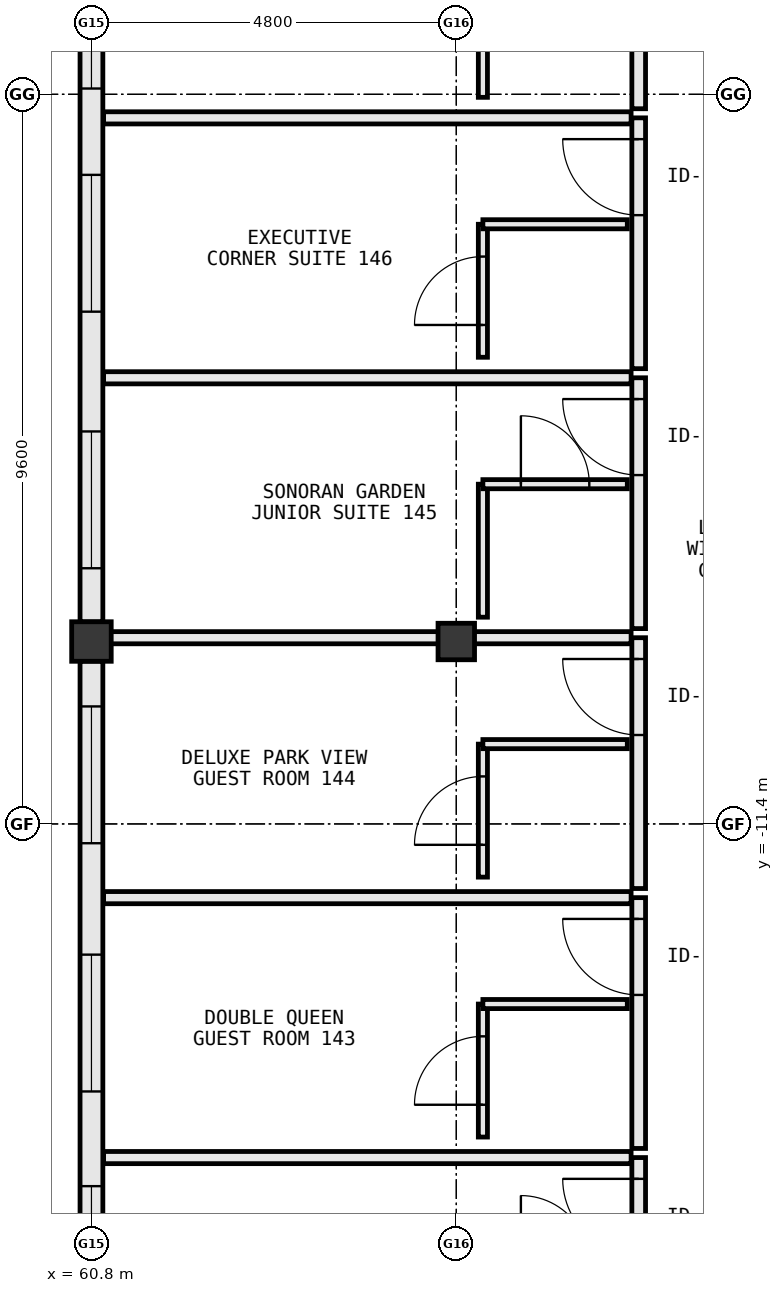
"""IFC4 building model, lengths in metres.
Left out: names, types, materials, properties, quantities, classifications, styles, units other than length and angle.
Written with IfcOpenShell. Run it as: python <this file> out.ifc"""

import sys

from ifc_helpers import new_model, si_unit, direction, frame, frame_2d, origin, origin_2d, place, context, subcontext, project, spatial, rectangle, extrude, element, fill, save


model = new_model("IFC4")
c1 = context("Model", 3, precision=1e-05, world=origin(), true_north=direction((0.0, 1.0)))
c2 = subcontext(c1, "Body", "Model", "MODEL_VIEW")
j1 = project(units=[si_unit("LENGTHUNIT", "METRE"), si_unit("PLANEANGLEUNIT", "RADIAN")], contexts=[c1])
p1 = place(None, origin())
s1 = spatial("IfcSite", under=j1, at=p1, CompositionType="ELEMENT")
p2 = place(p1, origin())
s2 = spatial("IfcBuilding", under=s1, at=p2, CompositionType="ELEMENT")
p3 = place(p2, frame((0.0, 0.0, 23.8)))
s3 = spatial("IfcBuildingStorey", under=s2, at=p3, CompositionType="ELEMENT", Elevation=23.8)
p4 = place(p3, frame((60.8, -9.0, 0.0), z_axis=(0.0, 0.0, 1.0), x_axis=(1.0, 0.0, 0.0)))
e1 = element("IfcColumn", 1, at=p4, inside=s3, PredefinedType="COLUMN", context=c2, shape_type="SweptSolid", body=[
    extrude(rectangle(XDim=0.52, YDim=0.52, at=origin_2d()), origin(), (0.0, 0.0, 1.0), 3.8),
])
p5 = place(p3, frame((65.6, -9.0, 0.0), z_axis=(0.0, 0.0, 1.0), x_axis=(1.0, 0.0, 0.0)))
e2 = element("IfcColumn", 2, at=p5, inside=s3, PredefinedType="COLUMN", context=c2, shape_type="SweptSolid", body=[
    extrude(rectangle(XDim=0.48, YDim=0.48, at=origin_2d()), origin(), (0.0, 0.0, 1.0), 3.8),
])
p6 = place(p3, frame((60.8, 0.342, 0.0), z_axis=(0.0, 0.0, 1.0), x_axis=(0.0, -1.0, 0.0)))
e3 = element("IfcWall", 3, at=p6, inside=s3, PredefinedType="STANDARD", context=c2, shape_type="SweptSolid", body=[
    extrude(rectangle(XDim=9.084, YDim=0.3, at=frame_2d((4.542, 0.0))), origin(), (0.0, 0.0, 1.0), 2.905),
])
p7 = place(p6, frame((6.578, 0.0, 0.85)))
e4 = element("IfcOpeningElement", 4, at=p7, cuts=e3, PredefinedType="OPENING", context=c2, shape_type="SweptSolid", body=[
    extrude(rectangle(XDim=1.8, YDim=1.85, at=frame_2d((0.9, 0.925))), frame((0.0, 0.162, 0.0), z_axis=(0.0, -1.0, 0.0), x_axis=(1.0, 0.0, 0.0)), (0.0, 0.0, 1.0), 0.324),
])
p8 = place(p6, frame((3.202, 0.0, 0.85)))
e5 = element("IfcOpeningElement", 5, at=p8, cuts=e3, PredefinedType="OPENING", context=c2, shape_type="SweptSolid", body=[
    extrude(rectangle(XDim=1.8, YDim=1.85, at=frame_2d((0.9, 0.925))), frame((0.0, 0.162, 0.0), z_axis=(0.0, -1.0, 0.0), x_axis=(1.0, 0.0, 0.0)), (0.0, 0.0, 1.0), 0.324),
])
p9 = place(p6, frame((0.266, 0.0, 0.85)))
e6 = element("IfcOpeningElement", 6, at=p9, cuts=e3, PredefinedType="OPENING", context=c2, shape_type="SweptSolid", body=[
    extrude(rectangle(XDim=1.8, YDim=1.85, at=frame_2d((0.9, 0.925))), frame((0.0, 0.162, 0.0), z_axis=(0.0, -1.0, 0.0), x_axis=(1.0, 0.0, 0.0)), (0.0, 0.0, 1.0), 0.324),
])
p10 = place(p3, frame((60.8, -9.258, 0.0), z_axis=(0.0, 0.0, 1.0), x_axis=(0.0, -1.0, 0.0)))
e7 = element("IfcWall", 7, at=p10, inside=s3, PredefinedType="STANDARD", context=c2, shape_type="SweptSolid", body=[
    extrude(rectangle(XDim=9.084, YDim=0.3, at=frame_2d((4.542, 0.0))), origin(), (0.0, 0.0, 1.0), 2.905),
])
p11 = place(p10, frame((6.908, 0.0, 0.85)))
e8 = element("IfcOpeningElement", 8, at=p11, cuts=e7, PredefinedType="OPENING", context=c2, shape_type="SweptSolid", body=[
    extrude(rectangle(XDim=1.8, YDim=1.85, at=frame_2d((0.9, 0.925))), frame((0.0, 0.162, 0.0), z_axis=(0.0, -1.0, 0.0), x_axis=(1.0, 0.0, 0.0)), (0.0, 0.0, 1.0), 0.324),
])
p12 = place(p10, frame((3.862, 0.0, 0.85)))
e9 = element("IfcOpeningElement", 9, at=p12, cuts=e7, PredefinedType="OPENING", context=c2, shape_type="SweptSolid", body=[
    extrude(rectangle(XDim=1.8, YDim=1.85, at=frame_2d((0.9, 0.925))), frame((0.0, 0.162, 0.0), z_axis=(0.0, -1.0, 0.0), x_axis=(1.0, 0.0, 0.0)), (0.0, 0.0, 1.0), 0.324),
])
p13 = place(p10, frame((0.596, 0.0, 0.85)))
e10 = element("IfcOpeningElement", 10, at=p13, cuts=e7, PredefinedType="OPENING", context=c2, shape_type="SweptSolid", body=[
    extrude(rectangle(XDim=1.8, YDim=1.85, at=frame_2d((0.9, 0.925))), frame((0.0, 0.162, 0.0), z_axis=(0.0, -1.0, 0.0), x_axis=(1.0, 0.0, 0.0)), (0.0, 0.0, 1.0), 0.324),
])
p14 = place(p3, frame((68.0, -19.09, 0.0), z_axis=(0.0, 0.0, 1.0), x_axis=(0.0, 1.0, 0.0)))
e11 = element("IfcWall", 11, at=p14, inside=s3, PredefinedType="PARTITIONING", context=c2, shape_type="SweptSolid", body=[
    extrude(rectangle(XDim=3.3, YDim=0.18, at=frame_2d((1.65, 0.0))), origin(), (0.0, 0.0, 1.0), 3.55),
])
p15 = place(p14, frame((2.02, 0.0, 0.0)))
e12 = element("IfcOpeningElement", 12, at=p15, cuts=e11, PredefinedType="OPENING", context=c2, shape_type="SweptSolid", body=[
    extrude(rectangle(XDim=1.0, YDim=2.2, at=frame_2d((0.5, 1.1))), frame((0.0, 0.102, 0.0), z_axis=(0.0, -1.0, 0.0), x_axis=(1.0, 0.0, 0.0)), (0.0, 0.0, 1.0), 0.204),
])
p16 = place(p3, frame((60.96, -15.79, 0.0), z_axis=(0.0, 0.0, 1.0), x_axis=(1.0, 0.0, 0.0)))
e13 = element("IfcWall", 13, at=p16, inside=s3, PredefinedType="PARTITIONING", context=c2, shape_type="SweptSolid", body=[
    extrude(rectangle(XDim=6.94, YDim=0.16, at=frame_2d((3.47, 0.0))), origin(), (0.0, 0.0, 1.0), 3.55),
])
p17 = place(p3, frame((68.0, -15.67, 0.0), z_axis=(0.0, 0.0, 1.0), x_axis=(0.0, 1.0, 0.0)))
e14 = element("IfcWall", 14, at=p17, inside=s3, PredefinedType="PARTITIONING", context=c2, shape_type="SweptSolid", body=[
    extrude(rectangle(XDim=3.3, YDim=0.18, at=frame_2d((1.65, 0.0))), origin(), (0.0, 0.0, 1.0), 3.55),
])
p18 = place(p17, frame((2.02, 0.0, 0.0)))
e15 = element("IfcOpeningElement", 15, at=p18, cuts=e14, PredefinedType="OPENING", context=c2, shape_type="SweptSolid", body=[
    extrude(rectangle(XDim=1.0, YDim=2.2, at=frame_2d((0.5, 1.1))), frame((0.0, 0.102, 0.0), z_axis=(0.0, -1.0, 0.0), x_axis=(1.0, 0.0, 0.0)), (0.0, 0.0, 1.0), 0.204),
])
p19 = place(p3, frame((60.96, -12.37, 0.0), z_axis=(0.0, 0.0, 1.0), x_axis=(1.0, 0.0, 0.0)))
e16 = element("IfcWall", 16, at=p19, inside=s3, PredefinedType="PARTITIONING", context=c2, shape_type="SweptSolid", body=[
    extrude(rectangle(XDim=6.94, YDim=0.16, at=frame_2d((3.47, 0.0))), origin(), (0.0, 0.0, 1.0), 3.55),
])
p20 = place(p3, frame((65.95, -15.52, 0.0), z_axis=(0.0, 0.0, 1.0), x_axis=(0.0, 1.0, 0.0)))
e17 = element("IfcWall", 17, at=p20, inside=s3, PredefinedType="PARTITIONING", context=c2, shape_type="SweptSolid", body=[
    extrude(rectangle(XDim=1.75, YDim=0.12, at=frame_2d((0.875, 0.0))), origin(), (0.0, 0.0, 1.0), 2.905),
])
p21 = place(p20, frame((0.425, 0.0, 0.0)))
e18 = element("IfcOpeningElement", 18, at=p21, cuts=e17, PredefinedType="OPENING", context=c2, shape_type="SweptSolid", body=[
    extrude(rectangle(XDim=0.9, YDim=2.15, at=frame_2d((0.45, 1.075))), frame((0.0, 0.072, 0.0), z_axis=(0.0, -1.0, 0.0), x_axis=(1.0, 0.0, 0.0)), (0.0, 0.0, 1.0), 0.144),
])
p22 = place(p3, frame((65.95, -13.77, 0.0), z_axis=(0.0, 0.0, 1.0), x_axis=(1.0, 0.0, 0.0)))
e19 = element("IfcWall", 19, at=p22, inside=s3, PredefinedType="PARTITIONING", context=c2, shape_type="SweptSolid", body=[
    extrude(rectangle(XDim=1.9, YDim=0.12, at=frame_2d((0.95, 0.0))), origin(), (0.0, 0.0, 1.0), 3.55),
])
p23 = place(p3, frame((68.0, -12.25, 0.0), z_axis=(0.0, 0.0, 1.0), x_axis=(0.0, 1.0, 0.0)))
e20 = element("IfcWall", 20, at=p23, inside=s3, PredefinedType="PARTITIONING", context=c2, shape_type="SweptSolid", body=[
    extrude(rectangle(XDim=3.3, YDim=0.18, at=frame_2d((1.65, 0.0))), origin(), (0.0, 0.0, 1.0), 3.55),
])
p24 = place(p23, frame((2.02, 0.0, 0.0)))
e21 = element("IfcOpeningElement", 21, at=p24, cuts=e20, PredefinedType="OPENING", context=c2, shape_type="SweptSolid", body=[
    extrude(rectangle(XDim=1.0, YDim=2.2, at=frame_2d((0.5, 1.1))), frame((0.0, 0.102, 0.0), z_axis=(0.0, -1.0, 0.0), x_axis=(1.0, 0.0, 0.0)), (0.0, 0.0, 1.0), 0.204),
])
p25 = place(p3, frame((60.96, -8.95, 0.0), z_axis=(0.0, 0.0, 1.0), x_axis=(1.0, 0.0, 0.0)))
e22 = element("IfcWall", 22, at=p25, inside=s3, PredefinedType="PARTITIONING", context=c2, shape_type="SweptSolid", body=[
    extrude(rectangle(XDim=6.94, YDim=0.16, at=frame_2d((3.47, 0.0))), origin(), (0.0, 0.0, 1.0), 3.005),
])
p26 = place(p3, frame((65.95, -12.1, 0.0), z_axis=(0.0, 0.0, 1.0), x_axis=(0.0, 1.0, 0.0)))
e23 = element("IfcWall", 23, at=p26, inside=s3, PredefinedType="PARTITIONING", context=c2, shape_type="SweptSolid", body=[
    extrude(rectangle(XDim=1.75, YDim=0.12, at=frame_2d((0.875, 0.0))), origin(), (0.0, 0.0, 1.0), 2.905),
])
p27 = place(p26, frame((0.425, 0.0, 0.0)))
e24 = element("IfcOpeningElement", 24, at=p27, cuts=e23, PredefinedType="OPENING", context=c2, shape_type="SweptSolid", body=[
    extrude(rectangle(XDim=0.9, YDim=2.15, at=frame_2d((0.45, 1.075))), frame((0.0, 0.072, 0.0), z_axis=(0.0, -1.0, 0.0), x_axis=(1.0, 0.0, 0.0)), (0.0, 0.0, 1.0), 0.144),
])
p28 = place(p3, frame((65.95, -10.35, 0.0), z_axis=(0.0, 0.0, 1.0), x_axis=(1.0, 0.0, 0.0)))
e25 = element("IfcWall", 25, at=p28, inside=s3, PredefinedType="PARTITIONING", context=c2, shape_type="SweptSolid", body=[
    extrude(rectangle(XDim=1.9, YDim=0.12, at=frame_2d((0.95, 0.0))), origin(), (0.0, 0.0, 1.0), 3.55),
])
p29 = place(p3, frame((68.0, -8.83, 0.0), z_axis=(0.0, 0.0, 1.0), x_axis=(0.0, 1.0, 0.0)))
e26 = element("IfcWall", 26, at=p29, inside=s3, PredefinedType="PARTITIONING", context=c2, shape_type="SweptSolid", body=[
    extrude(rectangle(XDim=3.3, YDim=0.18, at=frame_2d((1.65, 0.0))), origin(), (0.0, 0.0, 1.0), 3.55),
])
p30 = place(p29, frame((2.02, 0.0, 0.0)))
e27 = element("IfcOpeningElement", 27, at=p30, cuts=e26, PredefinedType="OPENING", context=c2, shape_type="SweptSolid", body=[
    extrude(rectangle(XDim=1.0, YDim=2.2, at=frame_2d((0.5, 1.1))), frame((0.0, 0.102, 0.0), z_axis=(0.0, -1.0, 0.0), x_axis=(1.0, 0.0, 0.0)), (0.0, 0.0, 1.0), 0.204),
])
p31 = place(p3, frame((60.96, -5.53, 0.0), z_axis=(0.0, 0.0, 1.0), x_axis=(1.0, 0.0, 0.0)))
e28 = element("IfcWall", 28, at=p31, inside=s3, PredefinedType="PARTITIONING", context=c2, shape_type="SweptSolid", body=[
    extrude(rectangle(XDim=6.94, YDim=0.16, at=frame_2d((3.47, 0.0))), origin(), (0.0, 0.0, 1.0), 3.55),
])
p32 = place(p3, frame((65.95, -8.68, 0.0), z_axis=(0.0, 0.0, 1.0), x_axis=(0.0, 1.0, 0.0)))
e29 = element("IfcWall", 29, at=p32, inside=s3, PredefinedType="PARTITIONING", context=c2, shape_type="SweptSolid", body=[
    extrude(rectangle(XDim=1.75, YDim=0.12, at=frame_2d((0.875, 0.0))), origin(), (0.0, 0.0, 1.0), 2.905),
])
p33 = place(p3, frame((65.95, -6.93, 0.0), z_axis=(0.0, 0.0, 1.0), x_axis=(1.0, 0.0, 0.0)))
e30 = element("IfcWall", 30, at=p33, inside=s3, PredefinedType="PARTITIONING", context=c2, shape_type="SweptSolid", body=[
    extrude(rectangle(XDim=1.9, YDim=0.12, at=frame_2d((0.95, 0.0))), origin(), (0.0, 0.0, 1.0), 3.55),
])
p34 = place(p33, frame((0.5, 0.0, 0.0)))
e31 = element("IfcOpeningElement", 31, at=p34, cuts=e30, PredefinedType="OPENING", context=c2, shape_type="SweptSolid", body=[
    extrude(rectangle(XDim=0.9, YDim=2.15, at=frame_2d((0.45, 1.075))), frame((0.0, 0.072, 0.0), z_axis=(0.0, -1.0, 0.0), x_axis=(1.0, 0.0, 0.0)), (0.0, 0.0, 1.0), 0.144),
])
p35 = place(p3, frame((68.0, -5.41, 0.0), z_axis=(0.0, 0.0, 1.0), x_axis=(0.0, 1.0, 0.0)))
e32 = element("IfcWall", 32, at=p35, inside=s3, PredefinedType="PARTITIONING", context=c2, shape_type="SweptSolid", body=[
    extrude(rectangle(XDim=3.3, YDim=0.18, at=frame_2d((1.65, 0.0))), origin(), (0.0, 0.0, 1.0), 3.55),
])
p36 = place(p35, frame((2.02, 0.0, 0.0)))
e33 = element("IfcOpeningElement", 33, at=p36, cuts=e32, PredefinedType="OPENING", context=c2, shape_type="SweptSolid", body=[
    extrude(rectangle(XDim=1.0, YDim=2.2, at=frame_2d((0.5, 1.1))), frame((0.0, 0.102, 0.0), z_axis=(0.0, -1.0, 0.0), x_axis=(1.0, 0.0, 0.0)), (0.0, 0.0, 1.0), 0.204),
])
p37 = place(p3, frame((60.96, -2.11, 0.0), z_axis=(0.0, 0.0, 1.0), x_axis=(1.0, 0.0, 0.0)))
e34 = element("IfcWall", 34, at=p37, inside=s3, PredefinedType="PARTITIONING", context=c2, shape_type="SweptSolid", body=[
    extrude(rectangle(XDim=6.94, YDim=0.16, at=frame_2d((3.47, 0.0))), origin(), (0.0, 0.0, 1.0), 3.55),
])
p38 = place(p3, frame((65.95, -5.26, 0.0), z_axis=(0.0, 0.0, 1.0), x_axis=(0.0, 1.0, 0.0)))
e35 = element("IfcWall", 35, at=p38, inside=s3, PredefinedType="PARTITIONING", context=c2, shape_type="SweptSolid", body=[
    extrude(rectangle(XDim=1.75, YDim=0.12, at=frame_2d((0.875, 0.0))), origin(), (0.0, 0.0, 1.0), 2.905),
])
p39 = place(p38, frame((0.425, 0.0, 0.0)))
e36 = element("IfcOpeningElement", 36, at=p39, cuts=e35, PredefinedType="OPENING", context=c2, shape_type="SweptSolid", body=[
    extrude(rectangle(XDim=0.9, YDim=2.15, at=frame_2d((0.45, 1.075))), frame((0.0, 0.072, 0.0), z_axis=(0.0, -1.0, 0.0), x_axis=(1.0, 0.0, 0.0)), (0.0, 0.0, 1.0), 0.144),
])
p40 = place(p3, frame((65.95, -3.51, 0.0), z_axis=(0.0, 0.0, 1.0), x_axis=(1.0, 0.0, 0.0)))
e37 = element("IfcWall", 37, at=p40, inside=s3, PredefinedType="PARTITIONING", context=c2, shape_type="SweptSolid", body=[
    extrude(rectangle(XDim=1.9, YDim=0.12, at=frame_2d((0.95, 0.0))), origin(), (0.0, 0.0, 1.0), 3.55),
])
p41 = place(p3, frame((68.0, -1.99, 0.0), z_axis=(0.0, 0.0, 1.0), x_axis=(0.0, 1.0, 0.0)))
e38 = element("IfcWall", 38, at=p41, inside=s3, PredefinedType="PARTITIONING", context=c2, shape_type="SweptSolid", body=[
    extrude(rectangle(XDim=3.3, YDim=0.18, at=frame_2d((1.65, 0.0))), origin(), (0.0, 0.0, 1.0), 3.55),
])
p42 = place(p41, frame((2.02, 0.0, 0.0)))
e39 = element("IfcOpeningElement", 39, at=p42, cuts=e38, PredefinedType="OPENING", context=c2, shape_type="SweptSolid", body=[
    extrude(rectangle(XDim=1.0, YDim=2.2, at=frame_2d((0.5, 1.1))), frame((0.0, 0.102, 0.0), z_axis=(0.0, -1.0, 0.0), x_axis=(1.0, 0.0, 0.0)), (0.0, 0.0, 1.0), 0.204),
])
p43 = place(p3, frame((65.95, -1.84, 0.0), z_axis=(0.0, 0.0, 1.0), x_axis=(0.0, 1.0, 0.0)))
e40 = element("IfcWall", 40, at=p43, inside=s3, PredefinedType="PARTITIONING", context=c2, shape_type="SweptSolid", body=[
    extrude(rectangle(XDim=1.75, YDim=0.12, at=frame_2d((0.875, 0.0))), origin(), (0.0, 0.0, 1.0), 2.905),
])
p44 = place(p11, origin())
e41 = element("IfcWindow", 41, at=p44, inside=s3, PartitioningType="SINGLE_PANEL", PredefinedType="WINDOW", context=c2, shape_type="SweptSolid", body=[
    extrude(rectangle(XDim=1.8, YDim=1.85, at=frame_2d((0.9, 0.925))), frame((0.0, 0.03, 0.0), z_axis=(0.0, -1.0, 0.0), x_axis=(1.0, 0.0, 0.0)), (0.0, 0.0, 1.0), 0.06),
])
fill(e8, e41)
p45 = place(p12, origin())
e42 = element("IfcWindow", 42, at=p45, inside=s3, PartitioningType="SINGLE_PANEL", PredefinedType="WINDOW", context=c2, shape_type="SweptSolid", body=[
    extrude(rectangle(XDim=1.8, YDim=1.85, at=frame_2d((0.9, 0.925))), frame((0.0, 0.03, 0.0), z_axis=(0.0, -1.0, 0.0), x_axis=(1.0, 0.0, 0.0)), (0.0, 0.0, 1.0), 0.06),
])
fill(e9, e42)
p46 = place(p13, origin())
e43 = element("IfcWindow", 43, at=p46, inside=s3, PartitioningType="SINGLE_PANEL", PredefinedType="WINDOW", context=c2, shape_type="SweptSolid", body=[
    extrude(rectangle(XDim=1.8, YDim=1.85, at=frame_2d((0.9, 0.925))), frame((0.0, 0.03, 0.0), z_axis=(0.0, -1.0, 0.0), x_axis=(1.0, 0.0, 0.0)), (0.0, 0.0, 1.0), 0.06),
])
fill(e10, e43)
p47 = place(p7, origin())
e44 = element("IfcWindow", 44, at=p47, inside=s3, PartitioningType="SINGLE_PANEL", PredefinedType="WINDOW", context=c2, shape_type="SweptSolid", body=[
    extrude(rectangle(XDim=1.8, YDim=1.85, at=frame_2d((0.9, 0.925))), frame((0.0, 0.03, 0.0), z_axis=(0.0, -1.0, 0.0), x_axis=(1.0, 0.0, 0.0)), (0.0, 0.0, 1.0), 0.06),
])
fill(e4, e44)
p48 = place(p8, origin())
e45 = element("IfcWindow", 45, at=p48, inside=s3, PartitioningType="SINGLE_PANEL", PredefinedType="WINDOW", context=c2, shape_type="SweptSolid", body=[
    extrude(rectangle(XDim=1.8, YDim=1.85, at=frame_2d((0.9, 0.925))), frame((0.0, 0.03, 0.0), z_axis=(0.0, -1.0, 0.0), x_axis=(1.0, 0.0, 0.0)), (0.0, 0.0, 1.0), 0.06),
])
fill(e5, e45)
p49 = place(p9, origin())
e46 = element("IfcWindow", 46, at=p49, inside=s3, PartitioningType="SINGLE_PANEL", PredefinedType="WINDOW", context=c2, shape_type="SweptSolid", body=[
    extrude(rectangle(XDim=1.8, YDim=1.85, at=frame_2d((0.9, 0.925))), frame((0.0, 0.03, 0.0), z_axis=(0.0, -1.0, 0.0), x_axis=(1.0, 0.0, 0.0)), (0.0, 0.0, 1.0), 0.06),
])
fill(e6, e46)
p50 = place(p15, origin())
e47 = element("IfcDoor", 47, at=p50, inside=s3, OperationType="SINGLE_SWING_RIGHT", PredefinedType="DOOR", context=c2, shape_type="SweptSolid", body=[
    extrude(rectangle(XDim=1.0, YDim=2.2, at=frame_2d((0.5, 1.1))), frame((0.0, 0.025, 0.0), z_axis=(0.0, -1.0, 0.0), x_axis=(1.0, 0.0, 0.0)), (0.0, 0.0, 1.0), 0.05),
])
fill(e12, e47)
p51 = place(p18, origin())
e48 = element("IfcDoor", 48, at=p51, inside=s3, OperationType="SINGLE_SWING_RIGHT", PredefinedType="DOOR", context=c2, shape_type="SweptSolid", body=[
    extrude(rectangle(XDim=1.0, YDim=2.2, at=frame_2d((0.5, 1.1))), frame((0.0, 0.025, 0.0), z_axis=(0.0, -1.0, 0.0), x_axis=(1.0, 0.0, 0.0)), (0.0, 0.0, 1.0), 0.05),
])
fill(e15, e48)
p52 = place(p21, origin())
e49 = element("IfcDoor", 49, at=p52, inside=s3, OperationType="SINGLE_SWING_LEFT", PredefinedType="DOOR", context=c2, shape_type="SweptSolid", body=[
    extrude(rectangle(XDim=0.9, YDim=2.15, at=frame_2d((0.45, 1.075))), frame((0.0, 0.025, 0.0), z_axis=(0.0, -1.0, 0.0), x_axis=(1.0, 0.0, 0.0)), (0.0, 0.0, 1.0), 0.05),
])
fill(e18, e49)
p53 = place(p24, origin())
e50 = element("IfcDoor", 50, at=p53, inside=s3, OperationType="SINGLE_SWING_RIGHT", PredefinedType="DOOR", context=c2, shape_type="SweptSolid", body=[
    extrude(rectangle(XDim=1.0, YDim=2.2, at=frame_2d((0.5, 1.1))), frame((0.0, 0.025, 0.0), z_axis=(0.0, -1.0, 0.0), x_axis=(1.0, 0.0, 0.0)), (0.0, 0.0, 1.0), 0.05),
])
fill(e21, e50)
p54 = place(p27, origin())
e51 = element("IfcDoor", 51, at=p54, inside=s3, OperationType="SINGLE_SWING_LEFT", PredefinedType="DOOR", context=c2, shape_type="SweptSolid", body=[
    extrude(rectangle(XDim=0.9, YDim=2.15, at=frame_2d((0.45, 1.075))), frame((0.0, 0.025, 0.0), z_axis=(0.0, -1.0, 0.0), x_axis=(1.0, 0.0, 0.0)), (0.0, 0.0, 1.0), 0.05),
])
fill(e24, e51)
p55 = place(p30, origin())
e52 = element("IfcDoor", 52, at=p55, inside=s3, OperationType="SINGLE_SWING_RIGHT", PredefinedType="DOOR", context=c2, shape_type="SweptSolid", body=[
    extrude(rectangle(XDim=1.0, YDim=2.2, at=frame_2d((0.5, 1.1))), frame((0.0, 0.025, 0.0), z_axis=(0.0, -1.0, 0.0), x_axis=(1.0, 0.0, 0.0)), (0.0, 0.0, 1.0), 0.05),
])
fill(e27, e52)
p56 = place(p34, origin())
e53 = element("IfcDoor", 53, at=p56, inside=s3, OperationType="SINGLE_SWING_LEFT", PredefinedType="DOOR", context=c2, shape_type="SweptSolid", body=[
    extrude(rectangle(XDim=0.9, YDim=2.15, at=frame_2d((0.45, 1.075))), frame((0.0, 0.025, 0.0), z_axis=(0.0, -1.0, 0.0), x_axis=(1.0, 0.0, 0.0)), (0.0, 0.0, 1.0), 0.05),
])
fill(e31, e53)
p57 = place(p36, origin())
e54 = element("IfcDoor", 54, at=p57, inside=s3, OperationType="SINGLE_SWING_RIGHT", PredefinedType="DOOR", context=c2, shape_type="SweptSolid", body=[
    extrude(rectangle(XDim=1.0, YDim=2.2, at=frame_2d((0.5, 1.1))), frame((0.0, 0.025, 0.0), z_axis=(0.0, -1.0, 0.0), x_axis=(1.0, 0.0, 0.0)), (0.0, 0.0, 1.0), 0.05),
])
fill(e33, e54)
p58 = place(p39, origin())
e55 = element("IfcDoor", 55, at=p58, inside=s3, OperationType="SINGLE_SWING_LEFT", PredefinedType="DOOR", context=c2, shape_type="SweptSolid", body=[
    extrude(rectangle(XDim=0.9, YDim=2.15, at=frame_2d((0.45, 1.075))), frame((0.0, 0.025, 0.0), z_axis=(0.0, -1.0, 0.0), x_axis=(1.0, 0.0, 0.0)), (0.0, 0.0, 1.0), 0.05),
])
fill(e36, e55)
save(model, sys.argv[1])
